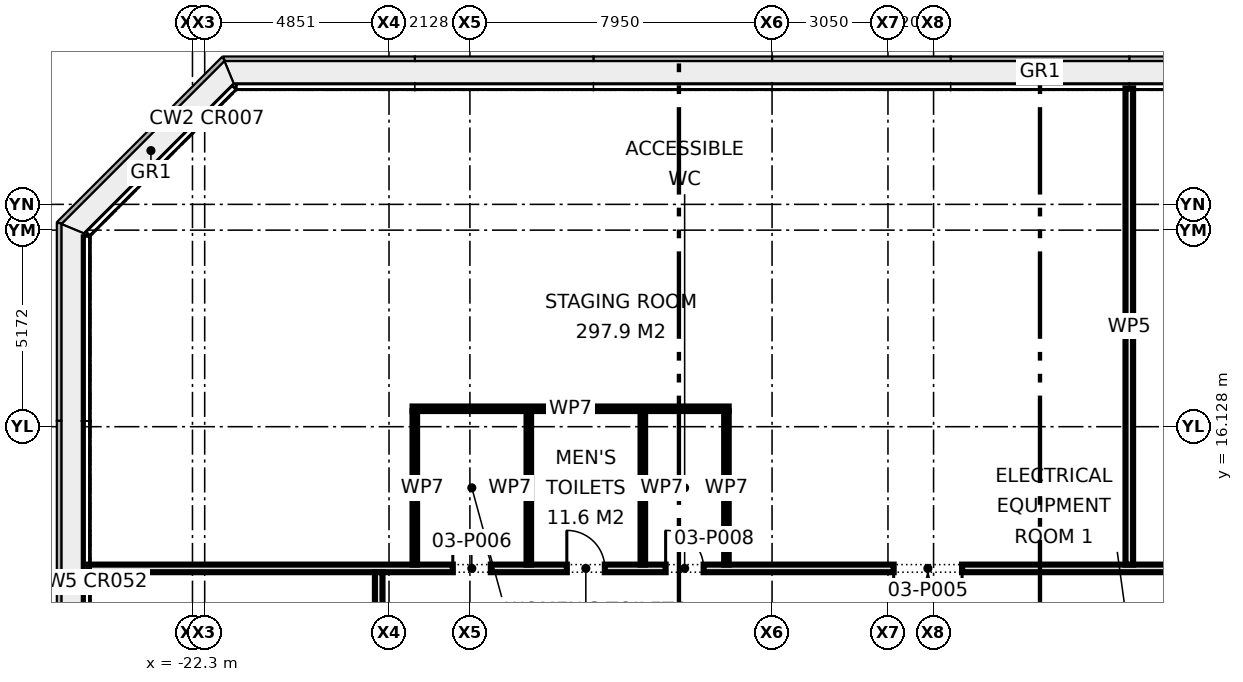
"""IFC4 building model, lengths in metres.
Left out: names, types, materials, properties, quantities, classifications, styles, units other than length and angle.
Written with IfcOpenShell. Run it as: python <this file> out.ifc"""

import sys

from ifc_helpers import new_model, si_unit, direction, frame, frame_2d, origin, place, context, subcontext, project, spatial, rectangle, extrude, element, fill, save


model = new_model("IFC4")
c1 = context("Model", 3, precision=1e-05, world=origin(), true_north=direction((0.0, 1.0)))
c2 = subcontext(c1, "Body", "Model", "MODEL_VIEW")
j1 = project(units=[si_unit("LENGTHUNIT", "METRE"), si_unit("PLANEANGLEUNIT", "RADIAN")], contexts=[c1])
p1 = place(None, origin())
s1 = spatial("IfcSite", under=j1, at=p1, CompositionType="ELEMENT")
p2 = place(p1, origin())
s2 = spatial("IfcBuilding", under=s1, at=p2, CompositionType="ELEMENT")
p3 = place(p2, frame((0.0, 0.0, 11.3)))
s3 = spatial("IfcBuildingStorey", under=s2, at=p3, CompositionType="ELEMENT", Elevation=11.3)
p4 = place(p3, frame((-25.03, 12.4, 0.0), z_axis=(0.0, 0.0, 1.0), x_axis=(1.0, 0.0, 0.0)))
e1 = element("IfcWall", 1, at=p4, inside=s3, PredefinedType="PARTITIONING", context=c2, shape_type="SweptSolid", body=[
    extrude(rectangle(XDim=50.06, YDim=0.2, at=frame_2d((25.03, 0.0))), origin(), (0.0, 0.0, 1.0), 4.575),
])
p5 = place(p4, frame((21.18, 0.0, 0.0)))
e2 = element("IfcOpeningElement", 2, at=p5, cuts=e1, PredefinedType="OPENING", context=c2, shape_type="SweptSolid", body=[
    extrude(rectangle(XDim=1.8, YDim=2.1, at=frame_2d((0.9, 1.05))), frame((0.0, 0.11, 0.0), z_axis=(0.0, -1.0, 0.0), x_axis=(1.0, 0.0, 0.0)), (0.0, 0.0, 1.0), 0.22),
])
p6 = place(p4, frame((9.58, 0.0, 0.0)))
e3 = element("IfcOpeningElement", 3, at=p6, cuts=e1, PredefinedType="OPENING", context=c2, shape_type="SweptSolid", body=[
    extrude(rectangle(XDim=1.0, YDim=2.1, at=frame_2d((0.5, 1.05))), frame((0.0, 0.11, 0.0), z_axis=(0.0, -1.0, 0.0), x_axis=(1.0, 0.0, 0.0)), (0.0, 0.0, 1.0), 0.22),
])
p7 = place(p4, frame((12.58, 0.0, 0.0)))
e4 = element("IfcOpeningElement", 4, at=p7, cuts=e1, PredefinedType="OPENING", context=c2, shape_type="SweptSolid", body=[
    extrude(rectangle(XDim=1.0, YDim=2.1, at=frame_2d((0.5, 1.05))), frame((0.0, 0.11, 0.0), z_axis=(0.0, -1.0, 0.0), x_axis=(1.0, 0.0, 0.0)), (0.0, 0.0, 1.0), 0.22),
])
p8 = place(p4, frame((15.18, 0.0, 0.0)))
e5 = element("IfcOpeningElement", 5, at=p8, cuts=e1, PredefinedType="OPENING", context=c2, shape_type="SweptSolid", body=[
    extrude(rectangle(XDim=1.0, YDim=2.1, at=frame_2d((0.5, 1.05))), frame((0.0, 0.11, 0.0), z_axis=(0.0, -1.0, 0.0), x_axis=(1.0, 0.0, 0.0)), (0.0, 0.0, 1.0), 0.22),
])
p9 = place(p4, frame((34.01, 0.0, 0.0)))
e6 = element("IfcOpeningElement", 6, at=p9, cuts=e1, PredefinedType="OPENING", context=c2, shape_type="SweptSolid", body=[
    extrude(rectangle(XDim=1.8, YDim=2.1, at=frame_2d((0.9, 1.05))), frame((0.0, 0.11, 0.0), z_axis=(0.0, -1.0, 0.0), x_axis=(1.0, 0.0, 0.0)), (0.0, 0.0, 1.0), 0.22),
])
p10 = place(p3, frame((2.35, 12.5, 0.0), z_axis=(0.0, 0.0, 1.0), x_axis=(0.0, 1.0, 0.0)))
e7 = element("IfcWall", 7, at=p10, inside=s3, PredefinedType="PARTITIONING", context=c2, shape_type="SweptSolid", body=[
    extrude(rectangle(XDim=12.53, YDim=0.2, at=frame_2d((6.265, 0.0))), origin(), (0.0, 0.0, 1.0), 4.575),
])
p11 = place(p3, frame((-17.4, -12.3, 0.0), z_axis=(0.0, 0.0, 1.0), x_axis=(0.0, 1.0, 0.0)))
e8 = element("IfcWall", 8, at=p11, inside=s3, PredefinedType="PARTITIONING", context=c2, shape_type="SweptSolid", body=[
    extrude(rectangle(XDim=24.6, YDim=0.2, at=frame_2d((12.3, 0.0))), origin(), (0.0, 0.0, 1.0), 4.575),
])
p12 = place(p11, frame((6.675, 0.0, 0.0)))
e9 = element("IfcOpeningElement", 9, at=p12, cuts=e8, PredefinedType="OPENING", context=c2, shape_type="SweptSolid", body=[
    extrude(rectangle(XDim=1.2, YDim=2.1, at=frame_2d((0.6, 1.05))), frame((0.0, 0.11, 0.0), z_axis=(0.0, -1.0, 0.0), x_axis=(1.0, 0.0, 0.0)), (0.0, 0.0, 1.0), 0.22),
])
p13 = place(p11, frame((18.775, 0.0, 0.0)))
e10 = element("IfcOpeningElement", 10, at=p13, cuts=e8, PredefinedType="OPENING", context=c2, shape_type="SweptSolid", body=[
    extrude(rectangle(XDim=1.8, YDim=2.1, at=frame_2d((0.9, 1.05))), frame((0.0, 0.11, 0.0), z_axis=(0.0, -1.0, 0.0), x_axis=(1.0, 0.0, 0.0)), (0.0, 0.0, 1.0), 0.22),
])
p14 = place(p3, frame((-16.509, 16.6, 0.0), z_axis=(0.0, 0.0, 1.0), x_axis=(1.0, 0.0, 0.0)))
e11 = element("IfcWall", 11, at=p14, inside=s3, PredefinedType="PARTITIONING", context=c2, shape_type="SweptSolid", body=[
    extrude(rectangle(XDim=8.318, YDim=0.12, at=frame_2d((4.159, 0.0))), origin(), (0.0, 0.0, 1.0), 4.575),
])
p15 = place(p3, frame((-8.25, 12.5, 0.0), z_axis=(0.0, 0.0, 1.0), x_axis=(0.0, 1.0, 0.0)))
e12 = element("IfcWall", 12, at=p15, inside=s3, PredefinedType="PARTITIONING", context=c2, shape_type="SweptSolid", body=[
    extrude(rectangle(XDim=4.039, YDim=0.12, at=frame_2d((2.02, 0.0))), origin(), (0.0, 0.0, 1.0), 4.575),
])
for number, where, z_axis, x_axis in (
    (13, (-10.45, 12.5, 0.0), (0.0, 0.0, 1.0), (0.0, 1.0, 0.0)),
    (14, (-13.45, 12.5, 0.0), (0.0, 0.0, 1.0), (0.0, 1.0, 0.0)),
):
    element("IfcWall", number, at=place(p3, frame(where, z_axis=z_axis, x_axis=x_axis)), inside=s3, PredefinedType="PARTITIONING", context=c2, shape_type="SweptSolid", body=[
        extrude(rectangle(XDim=4.04, YDim=0.12, at=frame_2d((2.02, 0.0))), origin(), (0.0, 0.0, 1.0), 4.575),
    ])
p16 = place(p3, frame((-16.45, 12.5, 0.0), z_axis=(0.0, 0.0, 1.0), x_axis=(0.0, 1.0, 0.0)))
e15 = element("IfcWall", 15, at=p16, inside=s3, PredefinedType="PARTITIONING", context=c2, shape_type="SweptSolid", body=[
    extrude(rectangle(XDim=4.039, YDim=0.12, at=frame_2d((2.02, 0.0))), origin(), (0.0, 0.0, 1.0), 4.575),
])
p17 = place(p5, frame((1.8, 0.0, 0.0), z_axis=(0.0, 0.0, 1.0), x_axis=(-1.0, 0.0, 0.0)))
e16 = element("IfcDoor", 16, at=p17, inside=s3, OperationType="DOUBLE_DOOR_SINGLE_SWING", PredefinedType="DOOR", context=c2, shape_type="SweptSolid", body=[
    extrude(rectangle(XDim=1.8, YDim=2.1, at=frame_2d((0.9, 1.05))), frame((0.0, 0.025, 0.0), z_axis=(0.0, -1.0, 0.0), x_axis=(1.0, 0.0, 0.0)), (0.0, 0.0, 1.0), 0.05),
])
fill(e2, e16)
p18 = place(p6, origin())
e17 = element("IfcDoor", 17, at=p18, inside=s3, OperationType="SINGLE_SWING_LEFT", PredefinedType="DOOR", context=c2, shape_type="SweptSolid", body=[
    extrude(rectangle(XDim=1.0, YDim=2.1, at=frame_2d((0.5, 1.05))), frame((0.0, 0.025, 0.0), z_axis=(0.0, -1.0, 0.0), x_axis=(1.0, 0.0, 0.0)), (0.0, 0.0, 1.0), 0.05),
])
fill(e3, e17)
p19 = place(p7, origin())
e18 = element("IfcDoor", 18, at=p19, inside=s3, OperationType="SINGLE_SWING_LEFT", PredefinedType="DOOR", context=c2, shape_type="SweptSolid", body=[
    extrude(rectangle(XDim=1.0, YDim=2.1, at=frame_2d((0.5, 1.05))), frame((0.0, 0.025, 0.0), z_axis=(0.0, -1.0, 0.0), x_axis=(1.0, 0.0, 0.0)), (0.0, 0.0, 1.0), 0.05),
])
fill(e4, e18)
p20 = place(p8, origin())
e19 = element("IfcDoor", 19, at=p20, inside=s3, OperationType="SINGLE_SWING_LEFT", PredefinedType="DOOR", context=c2, shape_type="SweptSolid", body=[
    extrude(rectangle(XDim=1.0, YDim=2.1, at=frame_2d((0.5, 1.05))), frame((0.0, 0.025, 0.0), z_axis=(0.0, -1.0, 0.0), x_axis=(1.0, 0.0, 0.0)), (0.0, 0.0, 1.0), 0.05),
])
fill(e5, e19)
save(model, sys.argv[1])
